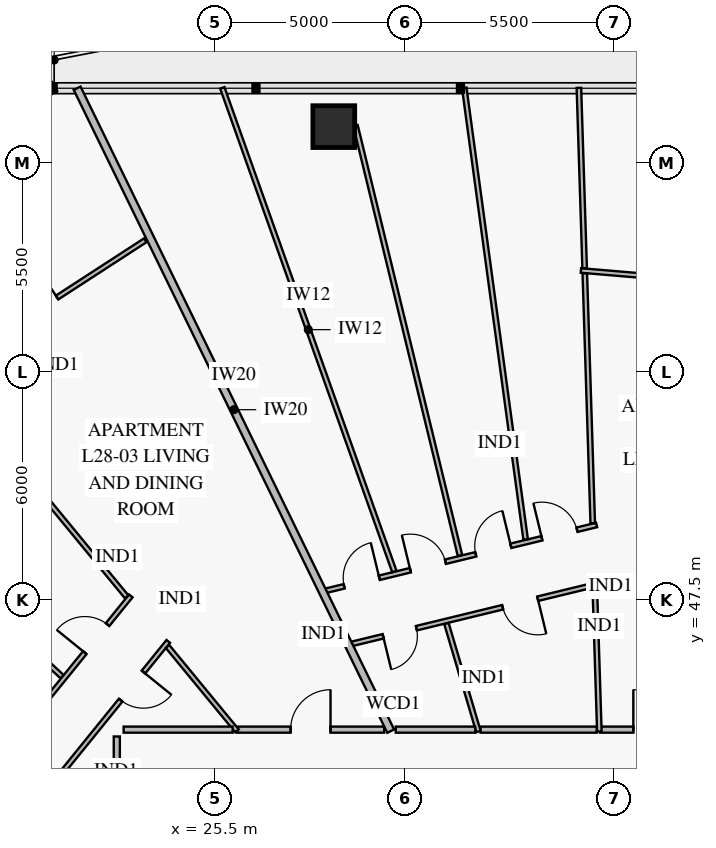
"""IFC4 building model, lengths in metres.
Left out: names, types, materials, properties, quantities, classifications, styles, units other than length and angle.
Written with IfcOpenShell. Run it as: python <this file> out.ifc"""

import sys

from ifc_helpers import new_model, si_unit, direction, frame, frame_2d, origin, origin_2d, place, context, subcontext, project, spatial, rectangle, extrude, element, fill, save


model = new_model("IFC4")
c1 = context("Model", 3, precision=1e-05, world=origin(), true_north=direction((0.0, 1.0)))
c2 = subcontext(c1, "Body", "Model", "MODEL_VIEW")
j1 = project(units=[si_unit("LENGTHUNIT", "METRE"), si_unit("PLANEANGLEUNIT", "RADIAN")], contexts=[c1])
p1 = place(None, origin())
s1 = spatial("IfcSite", under=j1, at=p1, CompositionType="ELEMENT")
p2 = place(p1, origin())
s2 = spatial("IfcBuilding", under=s1, at=p2, CompositionType="ELEMENT")
p3 = place(p2, frame((0.0, 0.0, 115.2)))
s3 = spatial("IfcBuildingStorey", under=s2, at=p3, CompositionType="ELEMENT", Elevation=115.2)
p4 = place(p3, frame((28.63, 59.948, 0.0), z_axis=(0.0, 0.0, 1.0), x_axis=(-1.0, 0.0, 0.0)))
e1 = element("IfcColumn", 1, at=p4, inside=s3, PredefinedType="COLUMN", context=c2, shape_type="SweptSolid", body=[
    extrude(rectangle(XDim=1.1, YDim=1.1, at=origin_2d()), origin(), (0.0, 0.0, 1.0), 3.55),
])
p5 = place(p3, frame((18.239, 59.249, 0.0), z_axis=(0.0, 0.0, 1.0), x_axis=(0.866007452331, 0.500031091541, 0.0)))
e2 = element("IfcWall", 2, at=p5, inside=s3, PredefinedType="SOLIDWALL", context=c2, shape_type="SweptSolid", body=[
    extrude(rectangle(XDim=3.515, YDim=0.28, at=frame_2d((1.757, 0.0))), origin(), (0.0, 0.0, 1.0), 3.55),
])
p6 = place(p3, frame((40.918, 55.673, 0.0), z_axis=(0.0, 0.0, 1.0), x_axis=(-0.996433818815, 0.084377987189, 0.0)))
e3 = element("IfcWall", 3, at=p6, inside=s3, PredefinedType="PARTITIONING", context=c2, shape_type="SweptSolid", body=[
    extrude(rectangle(XDim=5.807, YDim=0.12, at=frame_2d((2.904, 0.0))), origin(), (0.0, 0.0, 1.0), 3.55),
])
p7 = place(p6, frame((2.428, 0.0, 0.0)))
e4 = element("IfcOpeningElement", 4, at=p7, cuts=e3, PredefinedType="OPENING", context=c2, shape_type="SweptSolid", body=[
    extrude(rectangle(XDim=0.95, YDim=2.1, at=frame_2d((0.475, 1.05))), frame((0.0, 0.072, 0.0), z_axis=(0.0, -1.0, 0.0), x_axis=(1.0, 0.0, 0.0)), (0.0, 0.0, 1.0), 0.144),
])
p8 = place(p3, frame((35.594, 47.914, 0.0), z_axis=(0.0, 0.0, 1.0), x_axis=(-0.971707679159, -0.236186761404, 0.0)))
e5 = element("IfcWall", 5, at=p8, inside=s3, PredefinedType="PARTITIONING", context=c2, shape_type="SweptSolid", body=[
    extrude(rectangle(XDim=6.728, YDim=0.12, at=frame_2d((3.364, 0.0))), origin(), (0.0, 0.0, 1.0), 2.85),
])
p9 = place(p8, frame((1.644, 0.0, 0.0)))
e6 = element("IfcOpeningElement", 6, at=p9, cuts=e5, PredefinedType="OPENING", context=c2, shape_type="SweptSolid", body=[
    extrude(rectangle(XDim=0.95, YDim=2.1, at=frame_2d((0.475, 1.05))), frame((0.0, 0.072, 0.0), z_axis=(0.0, -1.0, 0.0), x_axis=(1.0, 0.0, 0.0)), (0.0, 0.0, 1.0), 0.144),
])
p10 = place(p8, frame((4.931, 0.0, 0.0)))
e7 = element("IfcOpeningElement", 7, at=p10, cuts=e5, PredefinedType="OPENING", context=c2, shape_type="SweptSolid", body=[
    extrude(rectangle(XDim=0.9, YDim=2.1, at=frame_2d((0.45, 1.05))), frame((0.0, 0.072, 0.0), z_axis=(0.0, -1.0, 0.0), x_axis=(1.0, 0.0, 0.0)), (0.0, 0.0, 1.0), 0.144),
])
p11 = place(p3, frame((35.545, 49.466, 0.0), z_axis=(0.0, 0.0, 1.0), x_axis=(-0.971712641416, -0.236166345002, 0.0)))
e8 = element("IfcWall", 8, at=p11, inside=s3, PredefinedType="PARTITIONING", context=c2, shape_type="SweptSolid", body=[
    extrude(rectangle(XDim=7.365, YDim=0.12, at=frame_2d((3.683, 0.0))), origin(), (0.0, 0.0, 1.0), 2.85),
])
p12 = place(p11, frame((0.531, 0.0, 0.0)))
e9 = element("IfcOpeningElement", 9, at=p12, cuts=e8, PredefinedType="OPENING", context=c2, shape_type="SweptSolid", body=[
    extrude(rectangle(XDim=0.95, YDim=2.1, at=frame_2d((0.475, 1.05))), frame((0.0, 0.072, 0.0), z_axis=(0.0, -1.0, 0.0), x_axis=(1.0, 0.0, 0.0)), (0.0, 0.0, 1.0), 0.144),
])
p13 = place(p11, frame((2.322, 0.0, 0.0)))
e10 = element("IfcOpeningElement", 10, at=p13, cuts=e8, PredefinedType="OPENING", context=c2, shape_type="SweptSolid", body=[
    extrude(rectangle(XDim=0.95, YDim=2.1, at=frame_2d((0.475, 1.05))), frame((0.0, 0.072, 0.0), z_axis=(0.0, -1.0, 0.0), x_axis=(1.0, 0.0, 0.0)), (0.0, 0.0, 1.0), 0.144),
])
p14 = place(p11, frame((4.094, 0.0, 0.0)))
e11 = element("IfcOpeningElement", 11, at=p14, cuts=e8, PredefinedType="OPENING", context=c2, shape_type="SweptSolid", body=[
    extrude(rectangle(XDim=0.95, YDim=2.1, at=frame_2d((0.475, 1.05))), frame((0.0, 0.072, 0.0), z_axis=(0.0, -1.0, 0.0), x_axis=(1.0, 0.0, 0.0)), (0.0, 0.0, 1.0), 0.144),
])
p15 = place(p11, frame((5.885, 0.0, 0.0)))
e12 = element("IfcOpeningElement", 12, at=p15, cuts=e8, PredefinedType="OPENING", context=c2, shape_type="SweptSolid", body=[
    extrude(rectangle(XDim=0.95, YDim=2.1, at=frame_2d((0.475, 1.05))), frame((0.0, 0.072, 0.0), z_axis=(0.0, -1.0, 0.0), x_axis=(1.0, 0.0, 0.0)), (0.0, 0.0, 1.0), 0.144),
])
p16 = place(p3, frame((38.437, 44.08, 0.0), z_axis=(0.0, 0.0, 1.0), x_axis=(-1.0, 0.0, 0.0)))
e13 = element("IfcWall", 13, at=p16, inside=s3, PredefinedType="PARTITIONING", context=c2, shape_type="SweptSolid", body=[
    extrude(rectangle(XDim=2.801, YDim=0.16, at=frame_2d((1.4, 0.0))), origin(), (0.0, 0.0, 1.0), 3.55),
])
p17 = place(p16, frame((0.875, 0.0, 0.0)))
e14 = element("IfcOpeningElement", 14, at=p17, cuts=e13, PredefinedType="OPENING", context=c2, shape_type="SweptSolid", body=[
    extrude(rectangle(XDim=1.05, YDim=2.15, at=frame_2d((0.525, 1.075))), frame((0.0, 0.092, 0.0), z_axis=(0.0, -1.0, 0.0), x_axis=(1.0, 0.0, 0.0)), (0.0, 0.0, 1.0), 0.184),
])
p18 = place(p3, frame((23.669, 56.957, 0.0), z_axis=(0.0, 0.0, 1.0), x_axis=(-0.838859022157, -0.544348731005, 0.0)))
e15 = element("IfcWall", 15, at=p18, inside=s3, PredefinedType="PARTITIONING", context=c2, shape_type="SweptSolid", body=[
    extrude(rectangle(XDim=6.482, YDim=0.12, at=frame_2d((3.241, 0.0))), origin(), (0.0, 0.0, 1.0), 2.8),
])
p19 = place(p18, frame((2.766, 0.0, 0.0)))
e16 = element("IfcOpeningElement", 16, at=p19, cuts=e15, PredefinedType="OPENING", context=c2, shape_type="SweptSolid", body=[
    extrude(rectangle(XDim=0.95, YDim=2.1, at=frame_2d((0.475, 1.05))), frame((0.0, 0.072, 0.0), z_axis=(0.0, -1.0, 0.0), x_axis=(1.0, 0.0, 0.0)), (0.0, 0.0, 1.0), 0.144),
])
p20 = place(p3, frame((24.275, 46.402, 0.0), z_axis=(0.0, 0.0, 1.0), x_axis=(-0.629602187024, -0.776917682959, 0.0)))
e17 = element("IfcWall", 17, at=p20, inside=s3, PredefinedType="PARTITIONING", context=c2, shape_type="SweptSolid", body=[
    extrude(rectangle(XDim=7.614, YDim=0.12, at=frame_2d((3.807, 0.0))), origin(), (0.0, 0.0, 1.0), 2.85),
])
p21 = place(p20, frame((1.038, 0.0, 0.0)))
e18 = element("IfcOpeningElement", 18, at=p21, cuts=e17, PredefinedType="OPENING", context=c2, shape_type="SweptSolid", body=[
    extrude(rectangle(XDim=0.95, YDim=2.1, at=frame_2d((0.475, 1.05))), frame((0.0, 0.072, 0.0), z_axis=(0.0, -1.0, 0.0), x_axis=(1.0, 0.0, 0.0)), (0.0, 0.0, 1.0), 0.144),
])
p22 = place(p20, frame((5.648, 0.0, 0.0)))
e19 = element("IfcOpeningElement", 19, at=p22, cuts=e17, PredefinedType="OPENING", context=c2, shape_type="SweptSolid", body=[
    extrude(rectangle(XDim=0.9, YDim=2.1, at=frame_2d((0.45, 1.05))), frame((0.0, 0.072, 0.0), z_axis=(0.0, -1.0, 0.0), x_axis=(1.0, 0.0, 0.0)), (0.0, 0.0, 1.0), 0.144),
])
p23 = place(p3, frame((23.289, 47.599, 0.0), z_axis=(0.0, 0.0, 1.0), x_axis=(-0.629618678783, -0.776904318001, 0.0)))
e20 = element("IfcWall", 20, at=p23, inside=s3, PredefinedType="PARTITIONING", context=c2, shape_type="SweptSolid", body=[
    extrude(rectangle(XDim=8.233, YDim=0.12, at=frame_2d((4.117, 0.0))), origin(), (0.0, 0.0, 1.0), 2.85),
])
p24 = place(p23, frame((0.972, 0.0, 0.0)))
e21 = element("IfcOpeningElement", 21, at=p24, cuts=e20, PredefinedType="OPENING", context=c2, shape_type="SweptSolid", body=[
    extrude(rectangle(XDim=0.95, YDim=2.1, at=frame_2d((0.475, 1.05))), frame((0.0, 0.072, 0.0), z_axis=(0.0, -1.0, 0.0), x_axis=(1.0, 0.0, 0.0)), (0.0, 0.0, 1.0), 0.144),
])
p25 = place(p23, frame((3.642, 0.0, 0.0)))
e22 = element("IfcOpeningElement", 22, at=p25, cuts=e20, PredefinedType="OPENING", context=c2, shape_type="SweptSolid", body=[
    extrude(rectangle(XDim=0.95, YDim=2.1, at=frame_2d((0.475, 1.05))), frame((0.0, 0.072, 0.0), z_axis=(0.0, -1.0, 0.0), x_axis=(1.0, 0.0, 0.0)), (0.0, 0.0, 1.0), 0.144),
])
p26 = place(p23, frame((6.311, 0.0, 0.0)))
e23 = element("IfcOpeningElement", 23, at=p26, cuts=e20, PredefinedType="OPENING", context=c2, shape_type="SweptSolid", body=[
    extrude(rectangle(XDim=0.95, YDim=2.1, at=frame_2d((0.475, 1.05))), frame((0.0, 0.072, 0.0), z_axis=(0.0, -1.0, 0.0), x_axis=(1.0, 0.0, 0.0)), (0.0, 0.0, 1.0), 0.144),
])
p27 = place(p3, frame((29.955, 44.08, 0.0), z_axis=(0.0, 0.0, 1.0), x_axis=(-1.0, 0.0, 0.0)))
e24 = element("IfcWall", 24, at=p27, inside=s3, PredefinedType="PARTITIONING", context=c2, shape_type="SweptSolid", body=[
    extrude(rectangle(XDim=3.873, YDim=0.16, at=frame_2d((1.937, 0.0))), origin(), (0.0, 0.0, 1.0), 3.55),
])
p28 = place(p27, frame((1.411, 0.0, 0.0)))
e25 = element("IfcOpeningElement", 25, at=p28, cuts=e24, PredefinedType="OPENING", context=c2, shape_type="SweptSolid", body=[
    extrude(rectangle(XDim=1.05, YDim=2.15, at=frame_2d((0.525, 1.075))), frame((0.0, 0.092, 0.0), z_axis=(0.0, -1.0, 0.0), x_axis=(1.0, 0.0, 0.0)), (0.0, 0.0, 1.0), 0.184),
])
p29 = place(p3, frame((32.436, 44.03, 0.0), z_axis=(0.0, 0.0, 1.0), x_axis=(-0.284043451939, 0.958811408678, 0.0)))
e26 = element("IfcWall", 26, at=p29, inside=s3, PredefinedType="PARTITIONING", context=c2, shape_type="SweptSolid", body=[
    extrude(rectangle(XDim=2.964, YDim=0.12, at=frame_2d((1.482, 0.0))), origin(), (0.0, 0.0, 1.0), 3.55),
])
p30 = place(p3, frame((33.678, 49.082, 0.0), z_axis=(0.0, 0.0, 1.0), x_axis=(-0.134673606825, 0.990890013889, 0.0)))
e27 = element("IfcWall", 27, at=p30, inside=s3, PredefinedType="PARTITIONING", context=c2, shape_type="SweptSolid", body=[
    extrude(rectangle(XDim=11.996, YDim=0.12, at=frame_2d((5.998, 0.0))), origin(), (0.0, 0.0, 1.0), 2.8),
])
p31 = place(p3, frame((31.95, 48.662, 0.0), z_axis=(0.0, 0.0, 1.0), x_axis=(-0.236162753776, 0.971713514226, 0.0)))
e28 = element("IfcWall", 28, at=p31, inside=s3, PredefinedType="PARTITIONING", context=c2, shape_type="SweptSolid", body=[
    extrude(rectangle(XDim=11.646, YDim=0.12, at=frame_2d((5.823, 0.0))), origin(), (0.0, 0.0, 1.0), 2.8),
])
p32 = place(p3, frame((30.223, 48.242, 0.0), z_axis=(0.0, 0.0, 1.0), x_axis=(-0.335110936566, 0.942178677425, 0.0)))
e29 = element("IfcWall", 29, at=p32, inside=s3, PredefinedType="PARTITIONING", context=c2, shape_type="SweptSolid", body=[
    extrude(rectangle(XDim=13.507, YDim=0.12, at=frame_2d((6.753, 0.0))), origin(), (0.0, 0.0, 1.0), 2.8),
])
p33 = place(p3, frame((35.618, 44.03, 0.0), z_axis=(0.0, 0.0, 1.0), x_axis=(-0.031741277153, 0.999496118714, 0.0)))
e30 = element("IfcWall", 30, at=p33, inside=s3, PredefinedType="PARTITIONING", context=c2, shape_type="SweptSolid", body=[
    extrude(rectangle(XDim=3.792, YDim=0.12, at=frame_2d((1.896, 0.0))), origin(), (0.0, 0.0, 1.0), 3.55),
])
p34 = place(p3, frame((35.444, 49.511, 0.0), z_axis=(0.0, 0.0, 1.0), x_axis=(-0.031770066641, 0.999495204023, 0.0)))
e31 = element("IfcWall", 31, at=p34, inside=s3, PredefinedType="PARTITIONING", context=c2, shape_type="SweptSolid", body=[
    extrude(rectangle(XDim=6.578, YDim=0.12, at=frame_2d((3.289, 0.0))), origin(), (0.0, 0.0, 1.0), 3.1),
])
p35 = place(p3, frame((35.23, 56.223, 0.0), z_axis=(0.0, 0.0, 1.0), x_axis=(-0.031724339577, 0.999496656462, 0.0)))
e32 = element("IfcWall", 32, at=p35, inside=s3, PredefinedType="PARTITIONING", context=c2, shape_type="SweptSolid", body=[
    extrude(rectangle(XDim=4.748, YDim=0.12, at=frame_2d((2.374, 0.0))), origin(), (0.0, 0.0, 1.0), 2.8),
])
p36 = place(p3, frame((30.128, 44.04, 0.0), z_axis=(0.0, 0.0, 1.0), x_axis=(-0.438372268699, 0.898793499106, 0.0)))
e33 = element("IfcWall", 33, at=p36, inside=s3, PredefinedType="PARTITIONING", context=c2, shape_type="SweptSolid", body=[
    extrude(rectangle(XDim=18.823, YDim=0.2, at=frame_2d((9.412, 0.0))), origin(), (0.0, 0.0, 1.0), 2.8),
])
p37 = place(p3, frame((21.479, 45.475, 0.0), z_axis=(0.0, 0.0, 1.0), x_axis=(-0.733013816474, 0.680213749389, 0.0)))
e34 = element("IfcWall", 34, at=p37, inside=s3, PredefinedType="PARTITIONING", context=c2, shape_type="SweptSolid", body=[
    extrude(rectangle(XDim=9.904, YDim=0.12, at=frame_2d((4.952, 0.0))), origin(), (0.0, 0.0, 1.0), 2.8),
])
p38 = place(p3, frame((26.082, 44.049, 0.0), z_axis=(0.0, 0.0, 1.0), x_axis=(-0.635546545523, 0.772062554767, 0.0)))
e35 = element("IfcWall", 35, at=p38, inside=s3, PredefinedType="PARTITIONING", context=c2, shape_type="SweptSolid", body=[
    extrude(rectangle(XDim=2.876, YDim=0.12, at=frame_2d((1.438, 0.0))), origin(), (0.0, 0.0, 1.0), 3.55),
])
p39 = place(p3, frame((23.18, 47.574, 0.0), z_axis=(0.0, 0.0, 1.0), x_axis=(-0.635541406611, 0.772066784989, 0.0)))
e36 = element("IfcWall", 36, at=p39, inside=s3, PredefinedType="PARTITIONING", context=c2, shape_type="SweptSolid", body=[
    extrude(rectangle(XDim=7.586, YDim=0.12, at=frame_2d((3.793, 0.0))), origin(), (0.0, 0.0, 1.0), 3.1),
])
p40 = place(p3, frame((22.96, 38.644, 0.0), z_axis=(0.0, 0.0, 1.0), x_axis=(-0.891012124705, 0.453979507939, 0.0)))
e37 = element("IfcWall", 37, at=p40, inside=s3, PredefinedType="PARTITIONING", context=c2, shape_type="SweptSolid", body=[
    extrude(rectangle(XDim=14.363, YDim=0.2, at=frame_2d((7.182, 0.0))), origin(), (0.0, 0.0, 1.0), 2.8),
])
p41 = place(p3, frame((35.548, 44.08, 0.0), z_axis=(0.0, 0.0, 1.0), x_axis=(-1.0, 0.0, 0.0)))
e38 = element("IfcWall", 38, at=p41, inside=s3, PredefinedType="PARTITIONING", context=c2, shape_type="SweptSolid", body=[
    extrude(rectangle(XDim=3.056, YDim=0.16, at=frame_2d((1.528, 0.0))), origin(), (0.0, 0.0, 1.0), 2.85),
])
p42 = place(p3, frame((32.351, 44.08, 0.0), z_axis=(0.0, 0.0, 1.0), x_axis=(-1.0, 0.0, 0.0)))
e39 = element("IfcWall", 39, at=p42, inside=s3, PredefinedType="PARTITIONING", context=c2, shape_type="SweptSolid", body=[
    extrude(rectangle(XDim=2.09, YDim=0.16, at=frame_2d((1.045, 0.0))), origin(), (0.0, 0.0, 1.0), 3.55),
])
p43 = place(p3, frame((25.968, 44.08, 0.0), z_axis=(0.0, 0.0, 1.0), x_axis=(-1.0, 0.0, 0.0)))
e40 = element("IfcWall", 40, at=p43, inside=s3, PredefinedType="PARTITIONING", context=c2, shape_type="SweptSolid", body=[
    extrude(rectangle(XDim=2.868, YDim=0.16, at=frame_2d((1.434, 0.0))), origin(), (0.0, 0.0, 1.0), 2.85),
])
p44 = place(p3, frame((22.92, 43.9, 0.0), z_axis=(0.0, 0.0, 1.0), x_axis=(0.0, -1.0, 0.0)))
e41 = element("IfcWall", 41, at=p44, inside=s3, PredefinedType="PARTITIONING", context=c2, shape_type="SweptSolid", body=[
    extrude(rectangle(XDim=2.223, YDim=0.16, at=frame_2d((1.112, 0.0))), origin(), (0.0, 0.0, 1.0), 3.55),
])
p45 = place(p9, origin())
e42 = element("IfcDoor", 42, at=p45, inside=s3, OperationType="SINGLE_SWING_LEFT", PredefinedType="DOOR", context=c2, shape_type="SweptSolid", body=[
    extrude(rectangle(XDim=0.95, YDim=2.1, at=frame_2d((0.475, 1.05))), frame((0.0, 0.025, 0.0), z_axis=(0.0, -1.0, 0.0), x_axis=(1.0, 0.0, 0.0)), (0.0, 0.0, 1.0), 0.05),
])
fill(e6, e42)
p46 = place(p10, origin())
e43 = element("IfcDoor", 43, at=p46, inside=s3, OperationType="SINGLE_SWING_RIGHT", PredefinedType="DOOR", context=c2, shape_type="SweptSolid", body=[
    extrude(rectangle(XDim=0.9, YDim=2.1, at=frame_2d((0.45, 1.05))), frame((0.0, 0.025, 0.0), z_axis=(0.0, -1.0, 0.0), x_axis=(1.0, 0.0, 0.0)), (0.0, 0.0, 1.0), 0.05),
])
fill(e7, e43)
p47 = place(p12, frame((0.95, 0.0, 0.0), z_axis=(0.0, 0.0, 1.0), x_axis=(-1.0, 0.0, 0.0)))
e44 = element("IfcDoor", 44, at=p47, inside=s3, OperationType="SINGLE_SWING_LEFT", PredefinedType="DOOR", context=c2, shape_type="SweptSolid", body=[
    extrude(rectangle(XDim=0.95, YDim=2.1, at=frame_2d((0.475, 1.05))), frame((0.0, 0.025, 0.0), z_axis=(0.0, -1.0, 0.0), x_axis=(1.0, 0.0, 0.0)), (0.0, 0.0, 1.0), 0.05),
])
fill(e9, e44)
p48 = place(p13, frame((0.95, 0.0, 0.0), z_axis=(0.0, 0.0, 1.0), x_axis=(-1.0, 0.0, 0.0)))
e45 = element("IfcDoor", 45, at=p48, inside=s3, OperationType="SINGLE_SWING_RIGHT", PredefinedType="DOOR", context=c2, shape_type="SweptSolid", body=[
    extrude(rectangle(XDim=0.95, YDim=2.1, at=frame_2d((0.475, 1.05))), frame((0.0, 0.025, 0.0), z_axis=(0.0, -1.0, 0.0), x_axis=(1.0, 0.0, 0.0)), (0.0, 0.0, 1.0), 0.05),
])
fill(e10, e45)
p49 = place(p14, frame((0.95, 0.0, 0.0), z_axis=(0.0, 0.0, 1.0), x_axis=(-1.0, 0.0, 0.0)))
e46 = element("IfcDoor", 46, at=p49, inside=s3, OperationType="SINGLE_SWING_LEFT", PredefinedType="DOOR", context=c2, shape_type="SweptSolid", body=[
    extrude(rectangle(XDim=0.95, YDim=2.1, at=frame_2d((0.475, 1.05))), frame((0.0, 0.025, 0.0), z_axis=(0.0, -1.0, 0.0), x_axis=(1.0, 0.0, 0.0)), (0.0, 0.0, 1.0), 0.05),
])
fill(e11, e46)
p50 = place(p15, frame((0.95, 0.0, 0.0), z_axis=(0.0, 0.0, 1.0), x_axis=(-1.0, 0.0, 0.0)))
e47 = element("IfcDoor", 47, at=p50, inside=s3, OperationType="SINGLE_SWING_RIGHT", PredefinedType="DOOR", context=c2, shape_type="SweptSolid", body=[
    extrude(rectangle(XDim=0.95, YDim=2.1, at=frame_2d((0.475, 1.05))), frame((0.0, 0.025, 0.0), z_axis=(0.0, -1.0, 0.0), x_axis=(1.0, 0.0, 0.0)), (0.0, 0.0, 1.0), 0.05),
])
fill(e12, e47)
p51 = place(p17, frame((1.05, 0.0, 0.0), z_axis=(0.0, 0.0, 1.0), x_axis=(-1.0, 0.0, 0.0)))
e48 = element("IfcDoor", 48, at=p51, inside=s3, OperationType="SINGLE_SWING_LEFT", PredefinedType="DOOR", context=c2, shape_type="SweptSolid", body=[
    extrude(rectangle(XDim=1.05, YDim=2.15, at=frame_2d((0.525, 1.075))), frame((0.0, 0.025, 0.0), z_axis=(0.0, -1.0, 0.0), x_axis=(1.0, 0.0, 0.0)), (0.0, 0.0, 1.0), 0.05),
])
fill(e14, e48)
p52 = place(p19, frame((0.95, 0.0, 0.0), z_axis=(0.0, 0.0, 1.0), x_axis=(-1.0, 0.0, 0.0)))
e49 = element("IfcDoor", 49, at=p52, inside=s3, OperationType="SINGLE_SWING_RIGHT", PredefinedType="DOOR", context=c2, shape_type="SweptSolid", body=[
    extrude(rectangle(XDim=0.95, YDim=2.1, at=frame_2d((0.475, 1.05))), frame((0.0, 0.025, 0.0), z_axis=(0.0, -1.0, 0.0), x_axis=(1.0, 0.0, 0.0)), (0.0, 0.0, 1.0), 0.05),
])
fill(e16, e49)
p53 = place(p21, origin())
e50 = element("IfcDoor", 50, at=p53, inside=s3, OperationType="SINGLE_SWING_LEFT", PredefinedType="DOOR", context=c2, shape_type="SweptSolid", body=[
    extrude(rectangle(XDim=0.95, YDim=2.1, at=frame_2d((0.475, 1.05))), frame((0.0, 0.025, 0.0), z_axis=(0.0, -1.0, 0.0), x_axis=(1.0, 0.0, 0.0)), (0.0, 0.0, 1.0), 0.05),
])
fill(e18, e50)
p54 = place(p24, frame((0.95, 0.0, 0.0), z_axis=(0.0, 0.0, 1.0), x_axis=(-1.0, 0.0, 0.0)))
e51 = element("IfcDoor", 51, at=p54, inside=s3, OperationType="SINGLE_SWING_LEFT", PredefinedType="DOOR", context=c2, shape_type="SweptSolid", body=[
    extrude(rectangle(XDim=0.95, YDim=2.1, at=frame_2d((0.475, 1.05))), frame((0.0, 0.025, 0.0), z_axis=(0.0, -1.0, 0.0), x_axis=(1.0, 0.0, 0.0)), (0.0, 0.0, 1.0), 0.05),
])
fill(e21, e51)
p55 = place(p28, frame((1.05, 0.0, 0.0), z_axis=(0.0, 0.0, 1.0), x_axis=(-1.0, 0.0, 0.0)))
e52 = element("IfcDoor", 52, at=p55, inside=s3, OperationType="SINGLE_SWING_RIGHT", PredefinedType="DOOR", context=c2, shape_type="SweptSolid", body=[
    extrude(rectangle(XDim=1.05, YDim=2.15, at=frame_2d((0.525, 1.075))), frame((0.0, 0.025, 0.0), z_axis=(0.0, -1.0, 0.0), x_axis=(1.0, 0.0, 0.0)), (0.0, 0.0, 1.0), 0.05),
])
fill(e25, e52)
save(model, sys.argv[1])
